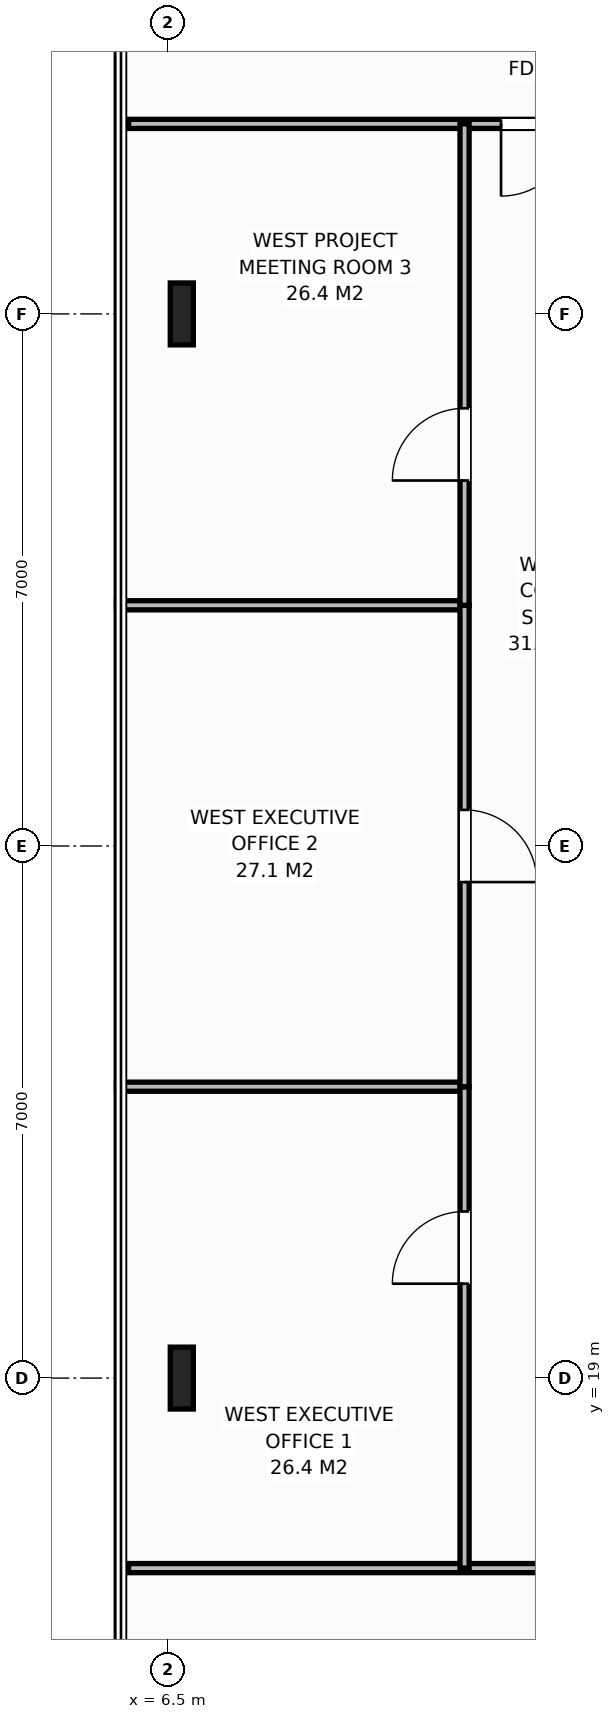
"""IFC4 building model, lengths in metres.
Left out: names, types, materials, properties, quantities, classifications, styles, units other than length and angle.
Written with IfcOpenShell. Run it as: python <this file> out.ifc"""

import sys

from ifc_helpers import new_model, si_unit, direction, frame, frame_2d, origin, origin_2d, place, context, subcontext, project, spatial, rectangle, i_section, extrude, element, fill, save


model = new_model("IFC4")
c1 = context("Model", 3, precision=1e-05, world=origin(), true_north=direction((0.0, 1.0)))
c2 = subcontext(c1, "Body", "Model", "MODEL_VIEW")
j1 = project(units=[si_unit("LENGTHUNIT", "METRE"), si_unit("PLANEANGLEUNIT", "RADIAN")], contexts=[c1])
p1 = place(None, origin())
s1 = spatial("IfcSite", under=j1, at=p1, CompositionType="ELEMENT")
p2 = place(p1, origin())
s2 = spatial("IfcBuilding", under=s1, at=p2, CompositionType="ELEMENT")
p3 = place(p2, frame((0.0, 0.0, 229.0)))
s3 = spatial("IfcBuildingStorey", under=s2, at=p3, CompositionType="ELEMENT", Elevation=229.0)
for number, where, z_axis, x_axis in (
    (1, (6.68, 19.0, 0.0), (0.0, 0.0, 1.0), (1.0, 0.0, 0.0)),
    (2, (6.68, 33.0, 0.0), (0.0, 0.0, 1.0), (1.0, 0.0, 0.0)),
):
    element("IfcColumn", number, at=place(p3, frame(where, z_axis=z_axis, x_axis=x_axis)), inside=s3, PredefinedType="COLUMN", context=c2, shape_type="SweptSolid", body=[
        extrude(i_section(OverallWidth=0.303, OverallDepth=0.814, WebThickness=0.021, FlangeThickness=0.04, at=origin_2d()), origin(), (0.0, 0.0, 1.0), 3.8),
    ])
p4 = place(p3, frame((5.98, 35.5, 0.0), z_axis=(0.0, 0.0, 1.0), x_axis=(1.0, 0.0, 0.0)))
e3 = element("IfcWall", 3, at=p4, inside=s3, PredefinedType="PARTITIONING", context=c2, shape_type="SweptSolid", body=[
    extrude(rectangle(XDim=7.16, YDim=0.12, at=frame_2d((3.58, 0.0))), origin(), (0.0, 0.0, 1.0), 3.58),
])
p5 = place(p4, frame((4.9, 0.0, 0.0)))
e4 = element("IfcOpeningElement", 4, at=p5, cuts=e3, PredefinedType="OPENING", context=c2, shape_type="SweptSolid", body=[
    extrude(rectangle(XDim=0.95, YDim=2.15, at=frame_2d((0.475, 1.075))), frame((0.0, 0.07, 0.0), z_axis=(0.0, -1.0, 0.0), x_axis=(1.0, 0.0, 0.0)), (0.0, 0.0, 1.0), 0.14),
])
p6 = place(p3, frame((5.98, 16.5, 0.0), z_axis=(0.0, 0.0, 1.0), x_axis=(1.0, 0.0, 0.0)))
e5 = element("IfcWall", 5, at=p6, inside=s3, PredefinedType="PARTITIONING", context=c2, shape_type="SweptSolid", body=[
    extrude(rectangle(XDim=14.04, YDim=0.12, at=frame_2d((7.02, 0.0))), origin(), (0.0, 0.0, 1.0), 3.58),
])
p7 = place(p6, frame((8.755, 0.0, 0.0)))
e6 = element("IfcOpeningElement", 6, at=p7, cuts=e5, PredefinedType="OPENING", context=c2, shape_type="SweptSolid", body=[
    extrude(rectangle(XDim=0.95, YDim=2.15, at=frame_2d((0.475, 1.075))), frame((0.0, 0.07, 0.0), z_axis=(0.0, -1.0, 0.0), x_axis=(1.0, 0.0, 0.0)), (0.0, 0.0, 1.0), 0.14),
])
p8 = place(p3, frame((5.82, 22.833, 0.0), z_axis=(0.0, 0.0, 1.0), x_axis=(1.0, 0.0, 0.0)))
e7 = element("IfcWall", 7, at=p8, inside=s3, PredefinedType="PARTITIONING", context=c2, shape_type="SweptSolid", body=[
    extrude(rectangle(XDim=4.58, YDim=0.12, at=frame_2d((2.29, 0.0))), origin(), (0.0, 0.0, 1.0), 3.58),
])
p9 = place(p3, frame((10.4, 16.5, 0.0), z_axis=(0.0, 0.0, 1.0), x_axis=(0.0, 1.0, 0.0)))
e8 = element("IfcWall", 8, at=p9, inside=s3, PredefinedType="PARTITIONING", context=c2, shape_type="SweptSolid", body=[
    extrude(rectangle(XDim=6.333, YDim=0.12, at=frame_2d((3.167, 0.0))), origin(), (0.0, 0.0, 1.0), 3.58),
])
p10 = place(p9, frame((3.742, 0.0, 0.0)))
e9 = element("IfcOpeningElement", 9, at=p10, cuts=e8, PredefinedType="OPENING", context=c2, shape_type="SweptSolid", body=[
    extrude(rectangle(XDim=0.95, YDim=2.15, at=frame_2d((0.475, 1.075))), frame((0.0, 0.07, 0.0), z_axis=(0.0, -1.0, 0.0), x_axis=(1.0, 0.0, 0.0)), (0.0, 0.0, 1.0), 0.14),
])
p11 = place(p3, frame((5.82, 29.167, 0.0), z_axis=(0.0, 0.0, 1.0), x_axis=(1.0, 0.0, 0.0)))
e10 = element("IfcWall", 10, at=p11, inside=s3, PredefinedType="PARTITIONING", context=c2, shape_type="SweptSolid", body=[
    extrude(rectangle(XDim=4.58, YDim=0.12, at=frame_2d((2.29, 0.0))), origin(), (0.0, 0.0, 1.0), 3.58),
])
p12 = place(p3, frame((10.4, 22.833, 0.0), z_axis=(0.0, 0.0, 1.0), x_axis=(0.0, 1.0, 0.0)))
e11 = element("IfcWall", 11, at=p12, inside=s3, PredefinedType="PARTITIONING", context=c2, shape_type="SweptSolid", body=[
    extrude(rectangle(XDim=6.333, YDim=0.12, at=frame_2d((3.167, 0.0))), origin(), (0.0, 0.0, 1.0), 3.58),
])
p13 = place(p12, frame((2.692, 0.0, 0.0)))
e12 = element("IfcOpeningElement", 12, at=p13, cuts=e11, PredefinedType="OPENING", context=c2, shape_type="SweptSolid", body=[
    extrude(rectangle(XDim=0.95, YDim=2.15, at=frame_2d((0.475, 1.075))), frame((0.0, 0.07, 0.0), z_axis=(0.0, -1.0, 0.0), x_axis=(1.0, 0.0, 0.0)), (0.0, 0.0, 1.0), 0.14),
])
p14 = place(p3, frame((10.4, 29.167, 0.0), z_axis=(0.0, 0.0, 1.0), x_axis=(0.0, 1.0, 0.0)))
e13 = element("IfcWall", 13, at=p14, inside=s3, PredefinedType="PARTITIONING", context=c2, shape_type="SweptSolid", body=[
    extrude(rectangle(XDim=6.333, YDim=0.12, at=frame_2d((3.167, 0.0))), origin(), (0.0, 0.0, 1.0), 3.58),
])
p15 = place(p14, frame((1.642, 0.0, 0.0)))
e14 = element("IfcOpeningElement", 14, at=p15, cuts=e13, PredefinedType="OPENING", context=c2, shape_type="SweptSolid", body=[
    extrude(rectangle(XDim=0.95, YDim=2.15, at=frame_2d((0.475, 1.075))), frame((0.0, 0.07, 0.0), z_axis=(0.0, -1.0, 0.0), x_axis=(1.0, 0.0, 0.0)), (0.0, 0.0, 1.0), 0.14),
])
p16 = place(p5, origin())
e15 = element("IfcDoor", 15, at=p16, inside=s3, OperationType="SINGLE_SWING_RIGHT", PredefinedType="DOOR", context=c2, shape_type="SweptSolid", body=[
    extrude(rectangle(XDim=0.95, YDim=2.15, at=frame_2d((0.475, 1.075))), frame((0.0, 0.025, 0.0), z_axis=(0.0, -1.0, 0.0), x_axis=(1.0, 0.0, 0.0)), (0.0, 0.0, 1.0), 0.05),
])
fill(e4, e15)
p17 = place(p10, origin())
e16 = element("IfcDoor", 16, at=p17, inside=s3, OperationType="SINGLE_SWING_LEFT", PredefinedType="DOOR", context=c2, shape_type="SweptSolid", body=[
    extrude(rectangle(XDim=0.95, YDim=2.15, at=frame_2d((0.475, 1.075))), frame((0.0, 0.025, 0.0), z_axis=(0.0, -1.0, 0.0), x_axis=(1.0, 0.0, 0.0)), (0.0, 0.0, 1.0), 0.05),
])
fill(e9, e16)
p18 = place(p13, origin())
e17 = element("IfcDoor", 17, at=p18, inside=s3, OperationType="SINGLE_SWING_RIGHT", PredefinedType="DOOR", context=c2, shape_type="SweptSolid", body=[
    extrude(rectangle(XDim=0.95, YDim=2.15, at=frame_2d((0.475, 1.075))), frame((0.0, 0.025, 0.0), z_axis=(0.0, -1.0, 0.0), x_axis=(1.0, 0.0, 0.0)), (0.0, 0.0, 1.0), 0.05),
])
fill(e12, e17)
p19 = place(p15, origin())
e18 = element("IfcDoor", 18, at=p19, inside=s3, OperationType="SINGLE_SWING_LEFT", PredefinedType="DOOR", context=c2, shape_type="SweptSolid", body=[
    extrude(rectangle(XDim=0.95, YDim=2.15, at=frame_2d((0.475, 1.075))), frame((0.0, 0.025, 0.0), z_axis=(0.0, -1.0, 0.0), x_axis=(1.0, 0.0, 0.0)), (0.0, 0.0, 1.0), 0.05),
])
fill(e14, e18)
save(model, sys.argv[1])
